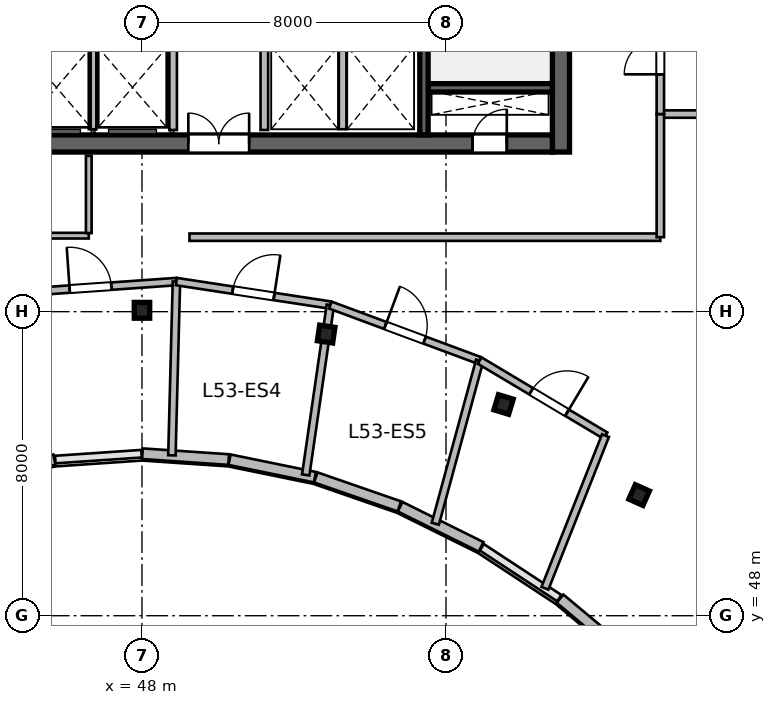
"""IFC4 building model, lengths in metres.
Left out: names, types, materials, properties, quantities, classifications, styles, units other than length and angle.
Written with IfcOpenShell. Run it as: python <this file> out.ifc"""

import sys

from ifc_helpers import new_model, si_unit, direction, frame, frame_2d, origin, origin_2d, place, context, subcontext, project, spatial, rectangle, i_section, extrude, source, transform, mapped, element, fill, save


model = new_model("IFC4")
c1 = context("Model", 3, precision=1e-05, world=origin(), true_north=direction((0.0, 1.0)))
c2 = subcontext(c1, "Body", "Model", "MODEL_VIEW")
j1 = project(units=[si_unit("LENGTHUNIT", "METRE"), si_unit("PLANEANGLEUNIT", "RADIAN")], contexts=[c1])
p1 = place(None, origin())
s1 = spatial("IfcSite", under=j1, at=p1, CompositionType="ELEMENT")
p2 = place(p1, origin())
s2 = spatial("IfcBuilding", under=s1, at=p2, CompositionType="ELEMENT")
p3 = place(p2, frame((0.0, 0.0, 219.6)))
s3 = spatial("IfcBuildingStorey", under=s2, at=p3, CompositionType="ELEMENT", Elevation=219.6)
m1 = source(origin(), c2, "Body", "SweptSolid", [
    extrude(rectangle(XDim=12.0, YDim=0.45, at=frame_2d((6.0, 0.0))), origin(), (0.0, 0.0, 1.0), 3.9),
])
p4 = place(p3, frame((59.025, 60.2, 0.0), z_axis=(0.0, 0.0, 1.0), x_axis=(0.0, 1.0, 0.0)))
e1 = element("IfcWall", 1, at=p4, inside=s3, PredefinedType="SHEAR", context=c2, shape_type="MappedRepresentation", body=[
    mapped(m1, transform((0.0, 0.0, 0.0), scale=1.0)),
])
m2 = source(origin(), c2, "Body", "SweptSolid", [
    extrude(rectangle(XDim=21.6, YDim=0.45, at=frame_2d((10.8, 0.0))), origin(), (0.0, 0.0, 1.0), 3.9),
])
p5 = place(p3, frame((37.2, 60.425, 0.0), z_axis=(0.0, 0.0, 1.0), x_axis=(1.0, 0.0, 0.0)))
e2 = element("IfcWall", 2, at=p5, inside=s3, PredefinedType="SHEAR", context=c2, shape_type="MappedRepresentation", body=[
    mapped(m2, transform((0.0, 0.0, 0.0), scale=1.0)),
])
p6 = place(p5, frame((1.1, 0.0, 0.0)))
e3 = element("IfcOpeningElement", 3, at=p6, cuts=e2, PredefinedType="OPENING", context=c2, shape_type="SweptSolid", body=[
    extrude(rectangle(XDim=1.15, YDim=2.15, at=frame_2d((0.575, 1.075))), frame((0.0, 0.235, 0.0), z_axis=(0.0, -1.0, 0.0), x_axis=(1.0, 0.0, 0.0)), (0.0, 0.0, 1.0), 0.47),
])
p7 = place(p5, frame((19.5, 0.0, 0.0)))
e4 = element("IfcOpeningElement", 4, at=p7, cuts=e2, PredefinedType="OPENING", context=c2, shape_type="SweptSolid", body=[
    extrude(rectangle(XDim=0.9, YDim=2.1, at=frame_2d((0.45, 1.05))), frame((0.0, 0.235, 0.0), z_axis=(0.0, -1.0, 0.0), x_axis=(1.0, 0.0, 0.0)), (0.0, 0.0, 1.0), 0.47),
])
p8 = place(p5, frame((12.02, 0.0, 0.0)))
e5 = element("IfcOpeningElement", 5, at=p8, cuts=e2, PredefinedType="OPENING", context=c2, shape_type="SweptSolid", body=[
    extrude(rectangle(XDim=1.6, YDim=2.15, at=frame_2d((0.8, 1.075))), frame((0.0, 0.235, 0.0), z_axis=(0.0, -1.0, 0.0), x_axis=(1.0, 0.0, 0.0)), (0.0, 0.0, 1.0), 0.47),
])
m3 = source(origin(), c2, "Body", "SweptSolid", [
    extrude(rectangle(XDim=3.27, YDim=0.22, at=frame_2d((1.635, 0.0))), origin(), (0.0, 0.0, 1.0), 3.9),
])
p9 = place(p3, frame((55.53, 61.89, 0.0), z_axis=(0.0, 0.0, 1.0), x_axis=(1.0, 0.0, 0.0)))
e6 = element("IfcWall", 6, at=p9, inside=s3, PredefinedType="SHEAR", context=c2, shape_type="MappedRepresentation", body=[
    mapped(m3, transform((0.0, 0.0, 0.0), scale=1.0)),
])
m4 = source(origin(), c2, "Body", "SweptSolid", [
    extrude(rectangle(XDim=11.1, YDim=0.22, at=frame_2d((5.55, 0.0))), origin(), (0.0, 0.0, 1.0), 3.9),
])
p10 = place(p3, frame((55.42, 60.65, 0.0), z_axis=(0.0, 0.0, 1.0), x_axis=(0.0, 1.0, 0.0)))
e7 = element("IfcWall", 7, at=p10, inside=s3, PredefinedType="SHEAR", context=c2, shape_type="MappedRepresentation", body=[
    mapped(m4, transform((0.0, 0.0, 0.0), scale=1.0)),
])
p11 = place(p10, frame((9.595, 0.0, 0.0)))
e8 = element("IfcOpeningElement", 8, at=p11, cuts=e7, PredefinedType="OPENING", context=c2, shape_type="SweptSolid", body=[
    extrude(rectangle(XDim=1.15, YDim=2.15, at=frame_2d((0.575, 1.075))), frame((0.0, 0.12, 0.0), z_axis=(0.0, -1.0, 0.0), x_axis=(1.0, 0.0, 0.0)), (0.0, 0.0, 1.0), 0.24),
])
m5 = source(origin(), c2, "Body", "SweptSolid", [
    extrude(i_section(OverallWidth=0.406, OverallDepth=0.416, WebThickness=0.03, FlangeThickness=0.048, at=origin_2d()), origin(), (0.0, 0.0, 1.0), 3.9),
])
for number, where, z_axis, x_axis in (
    (9, (48.0, 56.036, 0.0), (0.0, 0.0, 1.0), (0.0, 1.0, 0.0)),
    (10, (52.846, 55.411, 0.0), (0.0, 0.0, 1.0), (0.143, 0.99, 0.0)),
    (11, (57.515, 53.558, 0.0), (0.0, 0.0, 1.0), (0.289, 0.957, 0.0)),
    (12, (61.082, 51.175, 0.0), (0.0, 0.0, 1.0), (0.409, 0.912, 0.0)),
):
    element("IfcColumn", number, at=place(p3, frame(where, z_axis=z_axis, x_axis=x_axis)), inside=s3, PredefinedType="COLUMN", context=c2, shape_type="MappedRepresentation", body=[
        mapped(m5, transform((0.0, 0.0, 0.0), scale=1.0)),
    ])
m6 = source(origin(), c2, "Body", "SweptSolid", [
    extrude(rectangle(XDim=2.511, YDim=0.28, at=frame_2d((1.256, 0.0))), origin(), (0.0, 0.0, 1.0), 3.64),
])
p12 = place(p3, frame((60.928, 46.841, 0.0), z_axis=(0.0, 0.0, 1.0), x_axis=(-0.767910416122, 0.640557251782, 0.0)))
e13 = element("IfcWall", 13, at=p12, inside=s3, PredefinedType="SOLIDWALL", context=c2, shape_type="MappedRepresentation", body=[
    mapped(m6, transform((0.0, 0.0, 0.0), scale=1.0)),
])
m7 = source(origin(), c2, "Body", "SweptSolid", [
    extrude(rectangle(XDim=2.378, YDim=0.28, at=frame_2d((1.189, 0.0))), origin(), (0.0, 0.0, 1.0), 3.64),
])
p13 = place(p3, frame((56.924, 49.812, 0.0), z_axis=(0.0, 0.0, 1.0), x_axis=(-0.895941616831, 0.444171835252, 0.0)))
e14 = element("IfcWall", 14, at=p13, inside=s3, PredefinedType="SOLIDWALL", context=c2, shape_type="MappedRepresentation", body=[
    mapped(m7, transform((0.0, 0.0, 0.0), scale=1.0)),
])
m8 = source(origin(), c2, "Body", "SweptSolid", [
    extrude(rectangle(XDim=2.328, YDim=0.28, at=frame_2d((1.164, 0.0))), origin(), (0.0, 0.0, 1.0), 3.64),
])
p14 = place(p3, frame((54.772, 50.876, 0.0), z_axis=(0.0, 0.0, 1.0), x_axis=(-0.944872545641, 0.32743834915, 0.0)))
e15 = element("IfcWall", 15, at=p14, inside=s3, PredefinedType="SOLIDWALL", context=c2, shape_type="MappedRepresentation", body=[
    mapped(m8, transform((0.0, 0.0, 0.0), scale=1.0)),
])
m9 = source(origin(), c2, "Body", "SweptSolid", [
    extrude(rectangle(XDim=2.292, YDim=0.28, at=frame_2d((1.146, 0.0))), origin(), (0.0, 0.0, 1.0), 3.64),
])
p15 = place(p3, frame((52.55, 51.645, 0.0), z_axis=(0.0, 0.0, 1.0), x_axis=(-0.979635482689, 0.200784264963, 0.0)))
e16 = element("IfcWall", 16, at=p15, inside=s3, PredefinedType="SOLIDWALL", context=c2, shape_type="MappedRepresentation", body=[
    mapped(m9, transform((0.0, 0.0, 0.0), scale=1.0)),
])
m10 = source(origin(), c2, "Body", "SweptSolid", [
    extrude(rectangle(XDim=2.274, YDim=0.28, at=frame_2d((1.137, 0.0))), origin(), (0.0, 0.0, 1.0), 3.64),
])
p16 = place(p3, frame((50.281, 52.109, 0.0), z_axis=(0.0, 0.0, 1.0), x_axis=(-0.997702696995, 0.067744582138, 0.0)))
e17 = element("IfcWall", 17, at=p16, inside=s3, PredefinedType="SOLIDWALL", context=c2, shape_type="MappedRepresentation", body=[
    mapped(m10, transform((0.0, 0.0, 0.0), scale=1.0)),
])
p17 = place(p3, frame((45.695, 52.105, 0.0), z_axis=(0.0, 0.0, 1.0), x_axis=(-0.979635482689, -0.200784264963, 0.0)))
e18 = element("IfcWall", 18, at=p17, inside=s3, PredefinedType="SOLIDWALL", context=c2, shape_type="MappedRepresentation", body=[
    mapped(m9, transform((0.0, 0.0, 0.0), scale=1.0)),
])
m11 = source(origin(), c2, "Body", "SweptSolid", [
    extrude(rectangle(XDim=2.24, YDim=0.2, at=frame_2d((1.12, 0.0))), origin(), (0.0, 0.0, 1.0), 3.64),
])
for number, where, z_axis, x_axis in (
    (19, (48.82, 60.78, 0.0), (0.0, 0.0, 1.0), (0.0, 1.0, 0.0)),
    (20, (51.22, 60.78, 0.0), (0.0, 0.0, 1.0), (0.0, 1.0, 0.0)),
):
    element("IfcWall", number, at=place(p3, frame(where, z_axis=z_axis, x_axis=x_axis)), inside=s3, PredefinedType="SOLIDWALL", context=c2, shape_type="MappedRepresentation", body=[
        mapped(m11, transform((0.0, 0.0, 0.0), scale=1.0)),
    ])
m12 = source(origin(), c2, "Body", "SweptSolid", [
    extrude(rectangle(XDim=2.2, YDim=0.2, at=frame_2d((1.1, 0.0))), origin(), (0.0, 0.0, 1.0), 3.64),
])
for number, where, z_axis, x_axis in (
    (21, (46.7, 60.8, 0.0), (0.0, 0.0, 1.0), (0.0, 1.0, 0.0)),
    (22, (53.28, 60.8, 0.0), (0.0, 0.0, 1.0), (0.0, 1.0, 0.0)),
):
    element("IfcWall", number, at=place(p3, frame(where, z_axis=z_axis, x_axis=x_axis)), inside=s3, PredefinedType="SOLIDWALL", context=c2, shape_type="MappedRepresentation", body=[
        mapped(m12, transform((0.0, 0.0, 0.0), scale=1.0)),
    ])
m13 = source(origin(), c2, "Body", "SweptSolid", [
    extrude(rectangle(XDim=5.4, YDim=0.15, at=frame_2d((2.7, 0.0))), origin(), (0.0, 0.0, 1.0), 3.64),
])
p18 = place(p3, frame((41.2, 58.0, 0.0), z_axis=(0.0, 0.0, 1.0), x_axis=(1.0, 0.0, 0.0)))
e23 = element("IfcWall", 23, at=p18, inside=s3, PredefinedType="PARTITIONING", context=c2, shape_type="MappedRepresentation", body=[
    mapped(m13, transform((0.0, 0.0, 0.0), scale=1.0)),
])
m14 = source(origin(), c2, "Body", "SweptSolid", [
    extrude(rectangle(XDim=2.033, YDim=0.15, at=frame_2d((1.016, 0.0))), origin(), (0.0, 0.0, 1.0), 3.64),
])
p19 = place(p3, frame((46.6, 58.067, 0.0), z_axis=(0.0, 0.0, 1.0), x_axis=(0.0, 1.0, 0.0)))
e24 = element("IfcWall", 24, at=p19, inside=s3, PredefinedType="PARTITIONING", context=c2, shape_type="MappedRepresentation", body=[
    mapped(m14, transform((0.0, 0.0, 0.0), scale=1.0)),
])
m15 = source(origin(), c2, "Body", "SweptSolid", [
    extrude(rectangle(XDim=4.534, YDim=0.195, at=frame_2d((2.267, 0.0))), origin(), (0.0, 0.0, 1.0), 3.64),
])
p20 = place(p3, frame((44.384, 56.474, 0.0), z_axis=(0.0, 0.0, 1.0), x_axis=(0.997542735031, 0.070060629361, 0.0)))
e25 = element("IfcWall", 25, at=p20, inside=s3, PredefinedType="PARTITIONING", context=c2, shape_type="MappedRepresentation", body=[
    mapped(m15, transform((0.0, 0.0, 0.0), scale=1.0)),
])
p21 = place(p20, frame((1.717, 0.0, 0.0)))
e26 = element("IfcOpeningElement", 26, at=p21, cuts=e25, PredefinedType="OPENING", context=c2, shape_type="SweptSolid", body=[
    extrude(rectangle(XDim=1.1, YDim=2.15, at=frame_2d((0.55, 1.075))), frame((0.0, 0.107, 0.0), z_axis=(0.0, -1.0, 0.0), x_axis=(1.0, 0.0, 0.0)), (0.0, 0.0, 1.0), 0.215),
])
m16 = source(origin(), c2, "Body", "SweptSolid", [
    extrude(rectangle(XDim=4.573, YDim=0.195, at=frame_2d((2.287, 0.0))), origin(), (0.0, 0.0, 1.0), 3.64),
])
p22 = place(p3, frame((48.788, 52.22, 0.0), z_axis=(0.0, 0.0, 1.0), x_axis=(0.026049788838, 0.99966064667, 0.0)))
e27 = element("IfcWall", 27, at=p22, inside=s3, PredefinedType="PARTITIONING", context=c2, shape_type="MappedRepresentation", body=[
    mapped(m16, transform((0.0, 0.0, 0.0), scale=1.0)),
])
m17 = source(origin(), c2, "Body", "SweptSolid", [
    extrude(rectangle(XDim=4.097, YDim=0.195, at=frame_2d((2.049, 0.0))), origin(), (0.0, 0.0, 1.0), 3.64),
])
p23 = place(p3, frame((48.907, 56.792, 0.0), z_axis=(0.0, 0.0, 1.0), x_axis=(0.988545320847, -0.150924314249, 0.0)))
e28 = element("IfcWall", 28, at=p23, inside=s3, PredefinedType="PARTITIONING", context=c2, shape_type="MappedRepresentation", body=[
    mapped(m17, transform((0.0, 0.0, 0.0), scale=1.0)),
])
p24 = place(p23, frame((1.499, 0.0, 0.0)))
e29 = element("IfcOpeningElement", 29, at=p24, cuts=e28, PredefinedType="OPENING", context=c2, shape_type="SweptSolid", body=[
    extrude(rectangle(XDim=1.1, YDim=2.15, at=frame_2d((0.55, 1.075))), frame((0.0, 0.107, 0.0), z_axis=(0.0, -1.0, 0.0), x_axis=(1.0, 0.0, 0.0)), (0.0, 0.0, 1.0), 0.215),
])
m18 = source(origin(), c2, "Body", "SweptSolid", [
    extrude(rectangle(XDim=4.516, YDim=0.195, at=frame_2d((2.258, 0.0))), origin(), (0.0, 0.0, 1.0), 3.085),
])
p25 = place(p3, frame((52.309, 51.705, 0.0), z_axis=(0.0, 0.0, 1.0), x_axis=(0.143540347267, 0.989644465809, 0.0)))
e30 = element("IfcWall", 30, at=p25, inside=s3, PredefinedType="PARTITIONING", context=c2, shape_type="MappedRepresentation", body=[
    mapped(m18, transform((0.0, 0.0, 0.0), scale=1.0)),
])
m19 = source(origin(), c2, "Body", "SweptSolid", [
    extrude(rectangle(XDim=4.191, YDim=0.195, at=frame_2d((2.095, 0.0))), origin(), (0.0, 0.0, 1.0), 3.64),
])
p26 = place(p3, frame((52.957, 56.174, 0.0), z_axis=(0.0, 0.0, 1.0), x_axis=(0.937361695407, -0.348357649527, 0.0)))
e31 = element("IfcWall", 31, at=p26, inside=s3, PredefinedType="PARTITIONING", context=c2, shape_type="MappedRepresentation", body=[
    mapped(m19, transform((0.0, 0.0, 0.0), scale=1.0)),
])
p27 = place(p26, frame((1.545, 0.0, 0.0)))
e32 = element("IfcOpeningElement", 32, at=p27, cuts=e31, PredefinedType="OPENING", context=c2, shape_type="SweptSolid", body=[
    extrude(rectangle(XDim=1.1, YDim=2.15, at=frame_2d((0.55, 1.075))), frame((0.0, 0.107, 0.0), z_axis=(0.0, -1.0, 0.0), x_axis=(1.0, 0.0, 0.0)), (0.0, 0.0, 1.0), 0.215),
])
m20 = source(origin(), c2, "Body", "SweptSolid", [
    extrude(rectangle(XDim=4.449, YDim=0.195, at=frame_2d((2.225, 0.0))), origin(), (0.0, 0.0, 1.0), 3.64),
])
p28 = place(p3, frame((55.719, 50.42, 0.0), z_axis=(0.0, 0.0, 1.0), x_axis=(0.262123660516, 0.965034292965, 0.0)))
e33 = element("IfcWall", 33, at=p28, inside=s3, PredefinedType="PARTITIONING", context=c2, shape_type="MappedRepresentation", body=[
    mapped(m20, transform((0.0, 0.0, 0.0), scale=1.0)),
])
m21 = source(origin(), c2, "Body", "SweptSolid", [
    extrude(rectangle(XDim=3.856, YDim=0.195, at=frame_2d((1.928, 0.0))), origin(), (0.0, 0.0, 1.0), 3.64),
])
p29 = place(p3, frame((56.886, 54.714, 0.0), z_axis=(0.0, 0.0, 1.0), x_axis=(0.858797511375, -0.512315171019, 0.0)))
e34 = element("IfcWall", 34, at=p29, inside=s3, PredefinedType="PARTITIONING", context=c2, shape_type="MappedRepresentation", body=[
    mapped(m21, transform((0.0, 0.0, 0.0), scale=1.0)),
])
p30 = place(p29, frame((1.578, 0.0, 0.0)))
e35 = element("IfcOpeningElement", 35, at=p30, cuts=e34, PredefinedType="OPENING", context=c2, shape_type="SweptSolid", body=[
    extrude(rectangle(XDim=1.1, YDim=2.15, at=frame_2d((0.55, 1.075))), frame((0.0, 0.107, 0.0), z_axis=(0.0, -1.0, 0.0), x_axis=(1.0, 0.0, 0.0)), (0.0, 0.0, 1.0), 0.215),
])
m22 = source(origin(), c2, "Body", "SweptSolid", [
    extrude(rectangle(XDim=4.32, YDim=0.195, at=frame_2d((2.16, 0.0))), origin(), (0.0, 0.0, 1.0), 3.64),
])
p31 = place(p3, frame((58.604, 48.723, 0.0), z_axis=(0.0, 0.0, 1.0), x_axis=(0.368846295269, 0.929490403644, 0.0)))
e36 = element("IfcWall", 36, at=p31, inside=s3, PredefinedType="PARTITIONING", context=c2, shape_type="MappedRepresentation", body=[
    mapped(m22, transform((0.0, 0.0, 0.0), scale=1.0)),
])
m23 = source(origin(), c2, "Body", "SweptSolid", [
    extrude(rectangle(XDim=12.39, YDim=0.195, at=frame_2d((6.195, 0.0))), origin(), (0.0, 0.0, 1.0), 3.64),
])
p32 = place(p3, frame((49.25, 57.96, 0.0), z_axis=(0.0, 0.0, 1.0), x_axis=(1.0, 0.0, 0.0)))
e37 = element("IfcWall", 37, at=p32, inside=s3, PredefinedType="PARTITIONING", context=c2, shape_type="MappedRepresentation", body=[
    mapped(m23, transform((0.0, 0.0, 0.0), scale=1.0)),
])
m24 = source(origin(), c2, "Body", "SweptSolid", [
    extrude(rectangle(XDim=18.342, YDim=0.195, at=frame_2d((9.171, 0.0))), origin(), (0.0, 0.0, 1.0), 3.64),
])
p33 = place(p3, frame((61.64, 61.2, 0.0), z_axis=(0.0, 0.0, 1.0), x_axis=(1.0, 0.0, 0.0)))
e38 = element("IfcWall", 38, at=p33, inside=s3, PredefinedType="PARTITIONING", context=c2, shape_type="MappedRepresentation", body=[
    mapped(m24, transform((0.0, 0.0, 0.0), scale=1.0)),
])
m25 = source(origin(), c2, "Body", "SweptSolid", [
    extrude(rectangle(XDim=3.24, YDim=0.195, at=frame_2d((1.62, 0.0))), origin(), (0.0, 0.0, 1.0), 3.64),
])
p34 = place(p3, frame((61.64, 57.96, 0.0), z_axis=(0.0, 0.0, 1.0), x_axis=(0.0, 1.0, 0.0)))
e39 = element("IfcWall", 39, at=p34, inside=s3, PredefinedType="PARTITIONING", context=c2, shape_type="MappedRepresentation", body=[
    mapped(m25, transform((0.0, 0.0, 0.0), scale=1.0)),
])
m26 = source(origin(), c2, "Body", "SweptSolid", [
    extrude(rectangle(XDim=4.0, YDim=0.195, at=frame_2d((2.0, 0.0))), origin(), (0.0, 0.0, 1.0), 3.64),
])
p35 = place(p3, frame((61.64, 61.2, 0.0), z_axis=(0.0, 0.0, 1.0), x_axis=(0.0, 1.0, 0.0)))
e40 = element("IfcWall", 40, at=p35, inside=s3, PredefinedType="PARTITIONING", context=c2, shape_type="MappedRepresentation", body=[
    mapped(m26, transform((0.0, 0.0, 0.0), scale=1.0)),
])
p36 = place(p35, frame((1.045, 0.0, 0.0)))
e41 = element("IfcOpeningElement", 41, at=p36, cuts=e40, PredefinedType="OPENING", context=c2, shape_type="SweptSolid", body=[
    extrude(rectangle(XDim=0.95, YDim=2.1, at=frame_2d((0.475, 1.05))), frame((0.0, 0.107, 0.0), z_axis=(0.0, -1.0, 0.0), x_axis=(1.0, 0.0, 0.0)), (0.0, 0.0, 1.0), 0.215),
])
m27 = source(origin(), c2, "Body", "SweptSolid", [
    extrude(rectangle(XDim=0.9, YDim=2.1, at=frame_2d((0.45, 1.05))), frame((0.0, 0.025, 0.0), z_axis=(0.0, -1.0, 0.0), x_axis=(1.0, 0.0, 0.0)), (0.0, 0.0, 1.0), 0.05),
])
p37 = place(p7, origin())
e42 = element("IfcDoor", 42, at=p37, inside=s3, OperationType="SINGLE_SWING_RIGHT", PredefinedType="DOOR", context=c2, shape_type="MappedRepresentation", body=[
    mapped(m27, transform((0.0, 0.0, 0.0), scale=1.0)),
])
fill(e4, e42)
m28 = source(origin(), c2, "Body", "SweptSolid", [
    extrude(rectangle(XDim=1.6, YDim=2.15, at=frame_2d((0.8, 1.075))), frame((0.0, 0.025, 0.0), z_axis=(0.0, -1.0, 0.0), x_axis=(1.0, 0.0, 0.0)), (0.0, 0.0, 1.0), 0.05),
])
p38 = place(p8, origin())
e43 = element("IfcDoor", 43, at=p38, inside=s3, OperationType="DOUBLE_DOOR_SINGLE_SWING", PredefinedType="DOOR", context=c2, shape_type="MappedRepresentation", body=[
    mapped(m28, transform((0.0, 0.0, 0.0), scale=1.0)),
])
fill(e5, e43)
m29 = source(origin(), c2, "Body", "SweptSolid", [
    extrude(rectangle(XDim=1.1, YDim=2.15, at=frame_2d((0.55, 1.075))), frame((0.0, 0.025, 0.0), z_axis=(0.0, -1.0, 0.0), x_axis=(1.0, 0.0, 0.0)), (0.0, 0.0, 1.0), 0.05),
])
p39 = place(p21, origin())
e44 = element("IfcDoor", 44, at=p39, inside=s3, OperationType="SINGLE_SWING_LEFT", PredefinedType="DOOR", context=c2, shape_type="MappedRepresentation", body=[
    mapped(m29, transform((0.0, 0.0, 0.0), scale=1.0)),
])
fill(e26, e44)
p40 = place(p24, origin())
e45 = element("IfcDoor", 45, at=p40, inside=s3, OperationType="SINGLE_SWING_RIGHT", PredefinedType="DOOR", context=c2, shape_type="MappedRepresentation", body=[
    mapped(m29, transform((0.0, 0.0, 0.0), scale=1.0)),
])
fill(e29, e45)
p41 = place(p27, origin())
e46 = element("IfcDoor", 46, at=p41, inside=s3, OperationType="SINGLE_SWING_LEFT", PredefinedType="DOOR", context=c2, shape_type="MappedRepresentation", body=[
    mapped(m29, transform((0.0, 0.0, 0.0), scale=1.0)),
])
fill(e32, e46)
p42 = place(p30, origin())
e47 = element("IfcDoor", 47, at=p42, inside=s3, OperationType="SINGLE_SWING_RIGHT", PredefinedType="DOOR", context=c2, shape_type="MappedRepresentation", body=[
    mapped(m29, transform((0.0, 0.0, 0.0), scale=1.0)),
])
fill(e35, e47)
m30 = source(origin(), c2, "Body", "SweptSolid", [
    extrude(rectangle(XDim=0.95, YDim=2.1, at=frame_2d((0.475, 1.05))), frame((0.0, 0.025, 0.0), z_axis=(0.0, -1.0, 0.0), x_axis=(1.0, 0.0, 0.0)), (0.0, 0.0, 1.0), 0.05),
])
p43 = place(p36, origin())
e48 = element("IfcDoor", 48, at=p43, inside=s3, OperationType="SINGLE_SWING_LEFT", PredefinedType="DOOR", context=c2, shape_type="MappedRepresentation", body=[
    mapped(m30, transform((0.0, 0.0, 0.0), scale=1.0)),
])
fill(e41, e48)
save(model, sys.argv[1])
